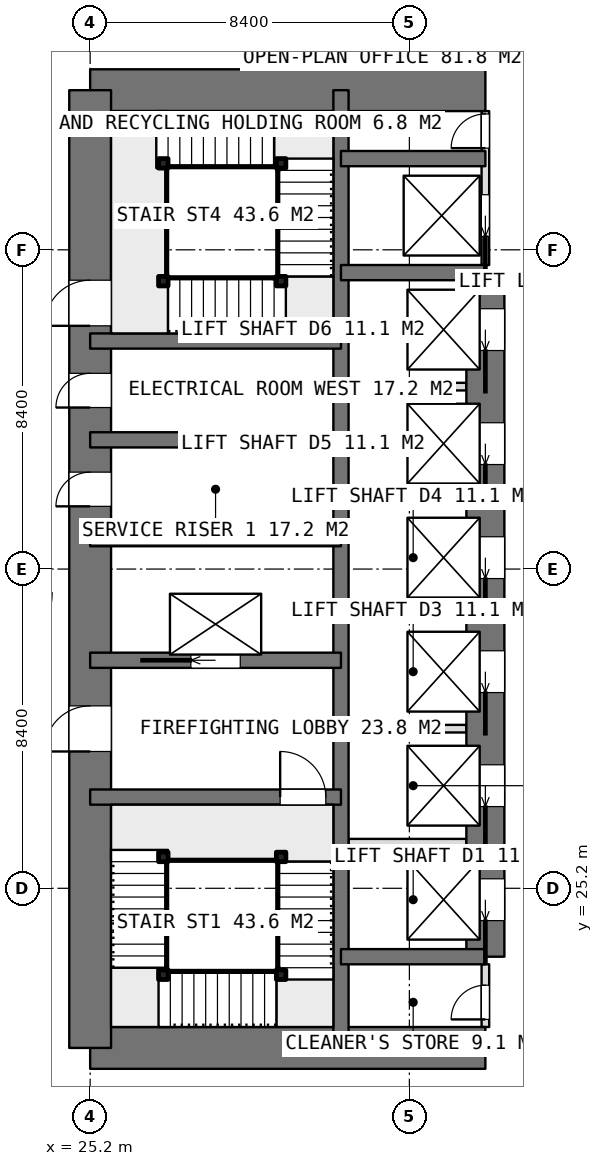
"""IFC4 building model, lengths in metres.
Left out: names, types, materials, properties, quantities, classifications, styles, units other than length and angle.
Written with IfcOpenShell. Run it as: python <this file> out.ifc"""

import sys

from ifc_helpers import new_model, si_unit, direction, frame, frame_2d, origin, origin_2d, place, context, subcontext, project, spatial, rectangle, extrude, element, fill, save


model = new_model("IFC4")
c1 = context("Model", 3, precision=1e-05, world=origin(), true_north=direction((0.0, 1.0)))
c2 = subcontext(c1, "Body", "Model", "MODEL_VIEW")
j1 = project(units=[si_unit("LENGTHUNIT", "METRE"), si_unit("PLANEANGLEUNIT", "RADIAN")], contexts=[c1])
p1 = place(None, origin())
s1 = spatial("IfcSite", under=j1, at=p1, CompositionType="ELEMENT")
p2 = place(p1, origin())
s2 = spatial("IfcBuilding", under=s1, at=p2, CompositionType="ELEMENT")
p3 = place(p2, frame((0.0, 0.0, 245.6)))
s3 = spatial("IfcBuildingStorey", under=s2, at=p3, CompositionType="ELEMENT", Elevation=245.6)
for number, where, z_axis, x_axis in (
    (1, (25.2, 21.0, 0.0), (0.0, 0.0, 1.0), (1.0, 0.0, 0.0)),
    (2, (25.2, 46.2, 0.0), (0.0, 0.0, 1.0), (1.0, 0.0, 0.0)),
):
    element("IfcWall", number, at=place(p3, frame(where, z_axis=z_axis, x_axis=x_axis)), inside=s3, PredefinedType="SHEAR", context=c2, shape_type="SweptSolid", body=[
        extrude(rectangle(XDim=10.4, YDim=1.1, at=frame_2d((5.2, 0.0))), origin(), (0.0, 0.0, 1.0), 4.5),
    ])
p4 = place(p3, frame((25.2, 21.0, 0.0), z_axis=(0.0, 0.0, 1.0), x_axis=(0.0, 1.0, 0.0)))
e3 = element("IfcWall", 3, at=p4, inside=s3, PredefinedType="SHEAR", context=c2, shape_type="SweptSolid", body=[
    extrude(rectangle(XDim=25.2, YDim=1.1, at=frame_2d((12.6, 0.0))), origin(), (0.0, 0.0, 1.0), 4.5),
])
p5 = place(p4, frame((7.8, 0.0, 0.0)))
e4 = element("IfcOpeningElement", 4, at=p5, cuts=e3, PredefinedType="OPENING", context=c2, shape_type="SweptSolid", body=[
    extrude(rectangle(XDim=1.2, YDim=2.1, at=frame_2d((0.6, 1.05))), frame((0.0, 0.56, 0.0), z_axis=(0.0, -1.0, 0.0), x_axis=(1.0, 0.0, 0.0)), (0.0, 0.0, 1.0), 1.12),
])
p6 = place(p4, frame((14.25, 0.0, 0.0)))
e5 = element("IfcOpeningElement", 5, at=p6, cuts=e3, PredefinedType="OPENING", context=c2, shape_type="SweptSolid", body=[
    extrude(rectangle(XDim=0.9, YDim=2.1, at=frame_2d((0.45, 1.05))), frame((0.0, 0.56, 0.0), z_axis=(0.0, -1.0, 0.0), x_axis=(1.0, 0.0, 0.0)), (0.0, 0.0, 1.0), 1.12),
])
p7 = place(p4, frame((16.85, 0.0, 0.0)))
e6 = element("IfcOpeningElement", 6, at=p7, cuts=e3, PredefinedType="OPENING", context=c2, shape_type="SweptSolid", body=[
    extrude(rectangle(XDim=0.9, YDim=2.1, at=frame_2d((0.45, 1.05))), frame((0.0, 0.56, 0.0), z_axis=(0.0, -1.0, 0.0), x_axis=(1.0, 0.0, 0.0)), (0.0, 0.0, 1.0), 1.12),
])
p8 = place(p4, frame((19.0, 0.0, 0.0)))
e7 = element("IfcOpeningElement", 7, at=p8, cuts=e3, PredefinedType="OPENING", context=c2, shape_type="SweptSolid", body=[
    extrude(rectangle(XDim=1.2, YDim=2.1, at=frame_2d((0.6, 1.05))), frame((0.0, 0.56, 0.0), z_axis=(0.0, -1.0, 0.0), x_axis=(1.0, 0.0, 0.0)), (0.0, 0.0, 1.0), 1.12),
])
p9 = place(p3, frame((31.8, 21.0, 0.0), z_axis=(0.0, 0.0, 1.0), x_axis=(0.0, 1.0, 0.0)))
e8 = element("IfcWall", 8, at=p9, inside=s3, PredefinedType="SHEAR", context=c2, shape_type="SweptSolid", body=[
    extrude(rectangle(XDim=25.2, YDim=0.4, at=frame_2d((12.6, 0.0))), origin(), (0.0, 0.0, 1.0), 4.5),
])
p10 = place(p3, frame((35.6, 23.4, 0.0), z_axis=(0.0, 0.0, 1.0), x_axis=(0.0, 1.0, 0.0)))
e9 = element("IfcWall", 9, at=p10, inside=s3, PredefinedType="SHEAR", context=c2, shape_type="SweptSolid", body=[
    extrude(rectangle(XDim=18.0, YDim=1.0, at=frame_2d((9.0, 0.0))), origin(), (0.0, 0.0, 1.0), 4.5),
])
p11 = place(p10, frame((0.95, 0.0, 0.0)))
e10 = element("IfcOpeningElement", 10, at=p11, cuts=e9, PredefinedType="OPENING", context=c2, shape_type="SweptSolid", body=[
    extrude(rectangle(XDim=1.1, YDim=2.1, at=frame_2d((0.55, 1.05))), frame((0.0, 0.51, 0.0), z_axis=(0.0, -1.0, 0.0), x_axis=(1.0, 0.0, 0.0)), (0.0, 0.0, 1.0), 1.02),
])
p12 = place(p10, frame((3.95, 0.0, 0.0)))
e11 = element("IfcOpeningElement", 11, at=p12, cuts=e9, PredefinedType="OPENING", context=c2, shape_type="SweptSolid", body=[
    extrude(rectangle(XDim=1.1, YDim=2.1, at=frame_2d((0.55, 1.05))), frame((0.0, 0.51, 0.0), z_axis=(0.0, -1.0, 0.0), x_axis=(1.0, 0.0, 0.0)), (0.0, 0.0, 1.0), 1.02),
])
p13 = place(p10, frame((6.95, 0.0, 0.0)))
e12 = element("IfcOpeningElement", 12, at=p13, cuts=e9, PredefinedType="OPENING", context=c2, shape_type="SweptSolid", body=[
    extrude(rectangle(XDim=1.1, YDim=2.1, at=frame_2d((0.55, 1.05))), frame((0.0, 0.51, 0.0), z_axis=(0.0, -1.0, 0.0), x_axis=(1.0, 0.0, 0.0)), (0.0, 0.0, 1.0), 1.02),
])
p14 = place(p10, frame((9.95, 0.0, 0.0)))
e13 = element("IfcOpeningElement", 13, at=p14, cuts=e9, PredefinedType="OPENING", context=c2, shape_type="SweptSolid", body=[
    extrude(rectangle(XDim=1.1, YDim=2.1, at=frame_2d((0.55, 1.05))), frame((0.0, 0.51, 0.0), z_axis=(0.0, -1.0, 0.0), x_axis=(1.0, 0.0, 0.0)), (0.0, 0.0, 1.0), 1.02),
])
p15 = place(p10, frame((12.95, 0.0, 0.0)))
e14 = element("IfcOpeningElement", 14, at=p15, cuts=e9, PredefinedType="OPENING", context=c2, shape_type="SweptSolid", body=[
    extrude(rectangle(XDim=1.1, YDim=2.1, at=frame_2d((0.55, 1.05))), frame((0.0, 0.51, 0.0), z_axis=(0.0, -1.0, 0.0), x_axis=(1.0, 0.0, 0.0)), (0.0, 0.0, 1.0), 1.02),
])
p16 = place(p10, frame((15.95, 0.0, 0.0)))
e15 = element("IfcOpeningElement", 15, at=p16, cuts=e9, PredefinedType="OPENING", context=c2, shape_type="SweptSolid", body=[
    extrude(rectangle(XDim=1.1, YDim=2.1, at=frame_2d((0.55, 1.05))), frame((0.0, 0.51, 0.0), z_axis=(0.0, -1.0, 0.0), x_axis=(1.0, 0.0, 0.0)), (0.0, 0.0, 1.0), 1.02),
])
for number, where, z_axis, x_axis in (
    (16, (31.8, 23.4, 0.0), (0.0, 0.0, 1.0), (1.0, 0.0, 0.0)),
    (17, (31.8, 41.4, 0.0), (0.0, 0.0, 1.0), (1.0, 0.0, 0.0)),
    (18, (31.8, 44.4, 0.0), (0.0, 0.0, 1.0), (1.0, 0.0, 0.0)),
):
    element("IfcWall", number, at=place(p3, frame(where, z_axis=z_axis, x_axis=x_axis)), inside=s3, PredefinedType="SHEAR", context=c2, shape_type="SweptSolid", body=[
        extrude(rectangle(XDim=3.8, YDim=0.4, at=frame_2d((1.9, 0.0))), origin(), (0.0, 0.0, 1.0), 4.5),
    ])
p17 = place(p3, frame((25.2, 27.6, 0.0), z_axis=(0.0, 0.0, 1.0), x_axis=(1.0, 0.0, 0.0)))
e19 = element("IfcWall", 19, at=p17, inside=s3, PredefinedType="SHEAR", context=c2, shape_type="SweptSolid", body=[
    extrude(rectangle(XDim=6.6, YDim=0.4, at=frame_2d((3.3, 0.0))), origin(), (0.0, 0.0, 1.0), 4.5),
])
p18 = place(p17, frame((5.0, 0.0, 0.0)))
e20 = element("IfcOpeningElement", 20, at=p18, cuts=e19, PredefinedType="OPENING", context=c2, shape_type="SweptSolid", body=[
    extrude(rectangle(XDim=1.2, YDim=2.1, at=frame_2d((0.6, 1.05))), frame((0.0, 0.21, 0.0), z_axis=(0.0, -1.0, 0.0), x_axis=(1.0, 0.0, 0.0)), (0.0, 0.0, 1.0), 0.42),
])
p19 = place(p3, frame((25.2, 31.2, 0.0), z_axis=(0.0, 0.0, 1.0), x_axis=(1.0, 0.0, 0.0)))
e21 = element("IfcWall", 21, at=p19, inside=s3, PredefinedType="SHEAR", context=c2, shape_type="SweptSolid", body=[
    extrude(rectangle(XDim=6.6, YDim=0.4, at=frame_2d((3.3, 0.0))), origin(), (0.0, 0.0, 1.0), 4.5),
])
p20 = place(p19, frame((2.65, 0.0, 0.0)))
e22 = element("IfcOpeningElement", 22, at=p20, cuts=e21, PredefinedType="OPENING", context=c2, shape_type="SweptSolid", body=[
    extrude(rectangle(XDim=1.3, YDim=2.1, at=frame_2d((0.65, 1.05))), frame((0.0, 0.21, 0.0), z_axis=(0.0, -1.0, 0.0), x_axis=(1.0, 0.0, 0.0)), (0.0, 0.0, 1.0), 0.42),
])
for number, where, z_axis, x_axis in (
    (23, (25.2, 34.4, 0.0), (0.0, 0.0, 1.0), (1.0, 0.0, 0.0)),
    (24, (25.2, 37.0, 0.0), (0.0, 0.0, 1.0), (1.0, 0.0, 0.0)),
    (25, (25.2, 39.6, 0.0), (0.0, 0.0, 1.0), (1.0, 0.0, 0.0)),
):
    element("IfcWall", number, at=place(p3, frame(where, z_axis=z_axis, x_axis=x_axis)), inside=s3, PredefinedType="SHEAR", context=c2, shape_type="SweptSolid", body=[
        extrude(rectangle(XDim=6.6, YDim=0.4, at=frame_2d((3.3, 0.0))), origin(), (0.0, 0.0, 1.0), 4.5),
    ])
for number, where, z_axis, x_axis in (
    (26, (32.0, 26.4, 0.0), (0.0, 0.0, 1.0), (1.0, 0.0, 0.0)),
    (27, (32.0, 29.4, 0.0), (0.0, 0.0, 1.0), (1.0, 0.0, 0.0)),
    (28, (32.0, 32.4, 0.0), (0.0, 0.0, 1.0), (1.0, 0.0, 0.0)),
    (29, (32.0, 35.4, 0.0), (0.0, 0.0, 1.0), (1.0, 0.0, 0.0)),
    (30, (32.0, 38.4, 0.0), (0.0, 0.0, 1.0), (1.0, 0.0, 0.0)),
):
    element("IfcWall", number, at=place(p3, frame(where, z_axis=z_axis, x_axis=x_axis)), inside=s3, PredefinedType="PARTITIONING", context=c2, shape_type="SweptSolid", body=[
        extrude(rectangle(XDim=3.1, YDim=0.2, at=frame_2d((1.55, 0.0))), origin(), (0.0, 0.0, 1.0), 4.25),
    ])
p21 = place(p3, frame((35.6, 41.6, 0.0), z_axis=(0.0, 0.0, 1.0), x_axis=(0.0, 1.0, 0.0)))
e31 = element("IfcWall", 31, at=p21, inside=s3, PredefinedType="PARTITIONING", context=c2, shape_type="SweptSolid", body=[
    extrude(rectangle(XDim=4.05, YDim=0.2, at=frame_2d((2.025, 0.0))), origin(), (0.0, 0.0, 1.0), 4.25),
])
p22 = place(p21, frame((3.075, 0.0, 0.0)))
e32 = element("IfcOpeningElement", 32, at=p22, cuts=e31, PredefinedType="OPENING", context=c2, shape_type="SweptSolid", body=[
    extrude(rectangle(XDim=0.9, YDim=2.1, at=frame_2d((0.45, 1.05))), frame((0.0, 0.11, 0.0), z_axis=(0.0, -1.0, 0.0), x_axis=(1.0, 0.0, 0.0)), (0.0, 0.0, 1.0), 0.22),
])
p23 = place(p21, frame((0.75, 0.0, 0.0)))
e33 = element("IfcOpeningElement", 33, at=p23, cuts=e31, PredefinedType="OPENING", context=c2, shape_type="SweptSolid", body=[
    extrude(rectangle(XDim=1.1, YDim=2.1, at=frame_2d((0.55, 1.05))), frame((0.0, 0.11, 0.0), z_axis=(0.0, -1.0, 0.0), x_axis=(1.0, 0.0, 0.0)), (0.0, 0.0, 1.0), 0.22),
])
p24 = place(p3, frame((35.6, 21.55, 0.0), z_axis=(0.0, 0.0, 1.0), x_axis=(0.0, 1.0, 0.0)))
e34 = element("IfcWall", 34, at=p24, inside=s3, PredefinedType="PARTITIONING", context=c2, shape_type="SweptSolid", body=[
    extrude(rectangle(XDim=1.65, YDim=0.2, at=frame_2d((0.825, 0.0))), origin(), (0.0, 0.0, 1.0), 4.25),
])
p25 = place(p24, frame((0.2, 0.0, 0.0)))
e35 = element("IfcOpeningElement", 35, at=p25, cuts=e34, PredefinedType="OPENING", context=c2, shape_type="SweptSolid", body=[
    extrude(rectangle(XDim=0.9, YDim=2.1, at=frame_2d((0.45, 1.05))), frame((0.0, 0.11, 0.0), z_axis=(0.0, -1.0, 0.0), x_axis=(1.0, 0.0, 0.0)), (0.0, 0.0, 1.0), 0.22),
])
for number, where, z_axis, x_axis in (
    (36, (30.225, 26.025, 0.0), (0.0, 0.0, 1.0), (1.0, 0.0, 0.0)),
    (37, (30.225, 22.925, 0.0), (0.0, 0.0, 1.0), (1.0, 0.0, 0.0)),
    (38, (27.125, 22.925, 0.0), (0.0, 0.0, 1.0), (1.0, 0.0, 0.0)),
    (39, (27.125, 26.025, 0.0), (0.0, 0.0, 1.0), (1.0, 0.0, 0.0)),
    (40, (27.125, 41.175, 0.0), (0.0, 0.0, 1.0), (1.0, 0.0, 0.0)),
    (41, (30.225, 41.175, 0.0), (0.0, 0.0, 1.0), (1.0, 0.0, 0.0)),
    (42, (30.225, 44.275, 0.0), (0.0, 0.0, 1.0), (1.0, 0.0, 0.0)),
    (43, (27.125, 44.275, 0.0), (0.0, 0.0, 1.0), (1.0, 0.0, 0.0)),
):
    element("IfcColumn", number, at=place(p3, frame(where, z_axis=z_axis, x_axis=x_axis)), inside=s3, PredefinedType="COLUMN", context=c2, shape_type="SweptSolid", body=[
        extrude(rectangle(XDim=0.25, YDim=0.25, at=origin_2d()), origin(), (0.0, 0.0, 1.0), 4.5),
    ])
p26 = place(p5, origin())
e44 = element("IfcDoor", 44, at=p26, inside=s3, OperationType="SINGLE_SWING_LEFT", PredefinedType="DOOR", context=c2, shape_type="SweptSolid", body=[
    extrude(rectangle(XDim=1.2, YDim=2.1, at=frame_2d((0.6, 1.05))), frame((0.0, 0.025, 0.0), z_axis=(0.0, -1.0, 0.0), x_axis=(1.0, 0.0, 0.0)), (0.0, 0.0, 1.0), 0.05),
])
fill(e4, e44)
p27 = place(p6, origin())
e45 = element("IfcDoor", 45, at=p27, inside=s3, OperationType="SINGLE_SWING_LEFT", PredefinedType="DOOR", context=c2, shape_type="SweptSolid", body=[
    extrude(rectangle(XDim=0.9, YDim=2.1, at=frame_2d((0.45, 1.05))), frame((0.0, 0.025, 0.0), z_axis=(0.0, -1.0, 0.0), x_axis=(1.0, 0.0, 0.0)), (0.0, 0.0, 1.0), 0.05),
])
fill(e5, e45)
p28 = place(p7, origin())
e46 = element("IfcDoor", 46, at=p28, inside=s3, OperationType="SINGLE_SWING_LEFT", PredefinedType="DOOR", context=c2, shape_type="SweptSolid", body=[
    extrude(rectangle(XDim=0.9, YDim=2.1, at=frame_2d((0.45, 1.05))), frame((0.0, 0.025, 0.0), z_axis=(0.0, -1.0, 0.0), x_axis=(1.0, 0.0, 0.0)), (0.0, 0.0, 1.0), 0.05),
])
fill(e6, e46)
p29 = place(p25, origin())
e47 = element("IfcDoor", 47, at=p29, inside=s3, OperationType="SINGLE_SWING_LEFT", PredefinedType="DOOR", context=c2, shape_type="SweptSolid", body=[
    extrude(rectangle(XDim=0.9, YDim=2.1, at=frame_2d((0.45, 1.05))), frame((0.0, 0.025, 0.0), z_axis=(0.0, -1.0, 0.0), x_axis=(1.0, 0.0, 0.0)), (0.0, 0.0, 1.0), 0.05),
])
fill(e35, e47)
p30 = place(p22, origin())
e48 = element("IfcDoor", 48, at=p30, inside=s3, OperationType="SINGLE_SWING_LEFT", PredefinedType="DOOR", context=c2, shape_type="SweptSolid", body=[
    extrude(rectangle(XDim=0.9, YDim=2.1, at=frame_2d((0.45, 1.05))), frame((0.0, 0.025, 0.0), z_axis=(0.0, -1.0, 0.0), x_axis=(1.0, 0.0, 0.0)), (0.0, 0.0, 1.0), 0.05),
])
fill(e32, e48)
p31 = place(p11, origin())
e49 = element("IfcDoor", 49, at=p31, inside=s3, OperationType="SLIDING_TO_LEFT", PredefinedType="USERDEFINED", context=c2, shape_type="SweptSolid", body=[
    extrude(rectangle(XDim=1.1, YDim=2.1, at=frame_2d((0.55, 1.05))), frame((0.0, 0.025, 0.0), z_axis=(0.0, -1.0, 0.0), x_axis=(1.0, 0.0, 0.0)), (0.0, 0.0, 1.0), 0.05),
])
fill(e10, e49)
p32 = place(p12, origin())
e50 = element("IfcDoor", 50, at=p32, inside=s3, OperationType="SLIDING_TO_LEFT", PredefinedType="USERDEFINED", context=c2, shape_type="SweptSolid", body=[
    extrude(rectangle(XDim=1.1, YDim=2.1, at=frame_2d((0.55, 1.05))), frame((0.0, 0.025, 0.0), z_axis=(0.0, -1.0, 0.0), x_axis=(1.0, 0.0, 0.0)), (0.0, 0.0, 1.0), 0.05),
])
fill(e11, e50)
p33 = place(p13, origin())
e51 = element("IfcDoor", 51, at=p33, inside=s3, OperationType="SLIDING_TO_LEFT", PredefinedType="USERDEFINED", context=c2, shape_type="SweptSolid", body=[
    extrude(rectangle(XDim=1.1, YDim=2.1, at=frame_2d((0.55, 1.05))), frame((0.0, 0.025, 0.0), z_axis=(0.0, -1.0, 0.0), x_axis=(1.0, 0.0, 0.0)), (0.0, 0.0, 1.0), 0.05),
])
fill(e12, e51)
p34 = place(p14, origin())
e52 = element("IfcDoor", 52, at=p34, inside=s3, OperationType="SLIDING_TO_LEFT", PredefinedType="USERDEFINED", context=c2, shape_type="SweptSolid", body=[
    extrude(rectangle(XDim=1.1, YDim=2.1, at=frame_2d((0.55, 1.05))), frame((0.0, 0.025, 0.0), z_axis=(0.0, -1.0, 0.0), x_axis=(1.0, 0.0, 0.0)), (0.0, 0.0, 1.0), 0.05),
])
fill(e13, e52)
p35 = place(p15, origin())
e53 = element("IfcDoor", 53, at=p35, inside=s3, OperationType="SLIDING_TO_LEFT", PredefinedType="USERDEFINED", context=c2, shape_type="SweptSolid", body=[
    extrude(rectangle(XDim=1.1, YDim=2.1, at=frame_2d((0.55, 1.05))), frame((0.0, 0.025, 0.0), z_axis=(0.0, -1.0, 0.0), x_axis=(1.0, 0.0, 0.0)), (0.0, 0.0, 1.0), 0.05),
])
fill(e14, e53)
p36 = place(p16, origin())
e54 = element("IfcDoor", 54, at=p36, inside=s3, OperationType="SLIDING_TO_LEFT", PredefinedType="USERDEFINED", context=c2, shape_type="SweptSolid", body=[
    extrude(rectangle(XDim=1.1, YDim=2.1, at=frame_2d((0.55, 1.05))), frame((0.0, 0.025, 0.0), z_axis=(0.0, -1.0, 0.0), x_axis=(1.0, 0.0, 0.0)), (0.0, 0.0, 1.0), 0.05),
])
fill(e15, e54)
p37 = place(p20, origin())
e55 = element("IfcDoor", 55, at=p37, inside=s3, OperationType="SLIDING_TO_LEFT", PredefinedType="USERDEFINED", context=c2, shape_type="SweptSolid", body=[
    extrude(rectangle(XDim=1.3, YDim=2.1, at=frame_2d((0.65, 1.05))), frame((0.0, 0.025, 0.0), z_axis=(0.0, -1.0, 0.0), x_axis=(1.0, 0.0, 0.0)), (0.0, 0.0, 1.0), 0.05),
])
fill(e22, e55)
p38 = place(p23, origin())
e56 = element("IfcDoor", 56, at=p38, inside=s3, OperationType="SLIDING_TO_LEFT", PredefinedType="USERDEFINED", context=c2, shape_type="SweptSolid", body=[
    extrude(rectangle(XDim=1.1, YDim=2.1, at=frame_2d((0.55, 1.05))), frame((0.0, 0.025, 0.0), z_axis=(0.0, -1.0, 0.0), x_axis=(1.0, 0.0, 0.0)), (0.0, 0.0, 1.0), 0.05),
])
fill(e33, e56)
p39 = place(p18, origin())
e57 = element("IfcDoor", 57, at=p39, inside=s3, OperationType="SINGLE_SWING_RIGHT", PredefinedType="DOOR", context=c2, shape_type="SweptSolid", body=[
    extrude(rectangle(XDim=1.2, YDim=2.1, at=frame_2d((0.6, 1.05))), frame((0.0, 0.025, 0.0), z_axis=(0.0, -1.0, 0.0), x_axis=(1.0, 0.0, 0.0)), (0.0, 0.0, 1.0), 0.05),
])
fill(e20, e57)
p40 = place(p8, origin())
e58 = element("IfcDoor", 58, at=p40, inside=s3, OperationType="SINGLE_SWING_RIGHT", PredefinedType="DOOR", context=c2, shape_type="SweptSolid", body=[
    extrude(rectangle(XDim=1.2, YDim=2.1, at=frame_2d((0.6, 1.05))), frame((0.0, 0.025, 0.0), z_axis=(0.0, -1.0, 0.0), x_axis=(1.0, 0.0, 0.0)), (0.0, 0.0, 1.0), 0.05),
])
fill(e7, e58)
save(model, sys.argv[1])
